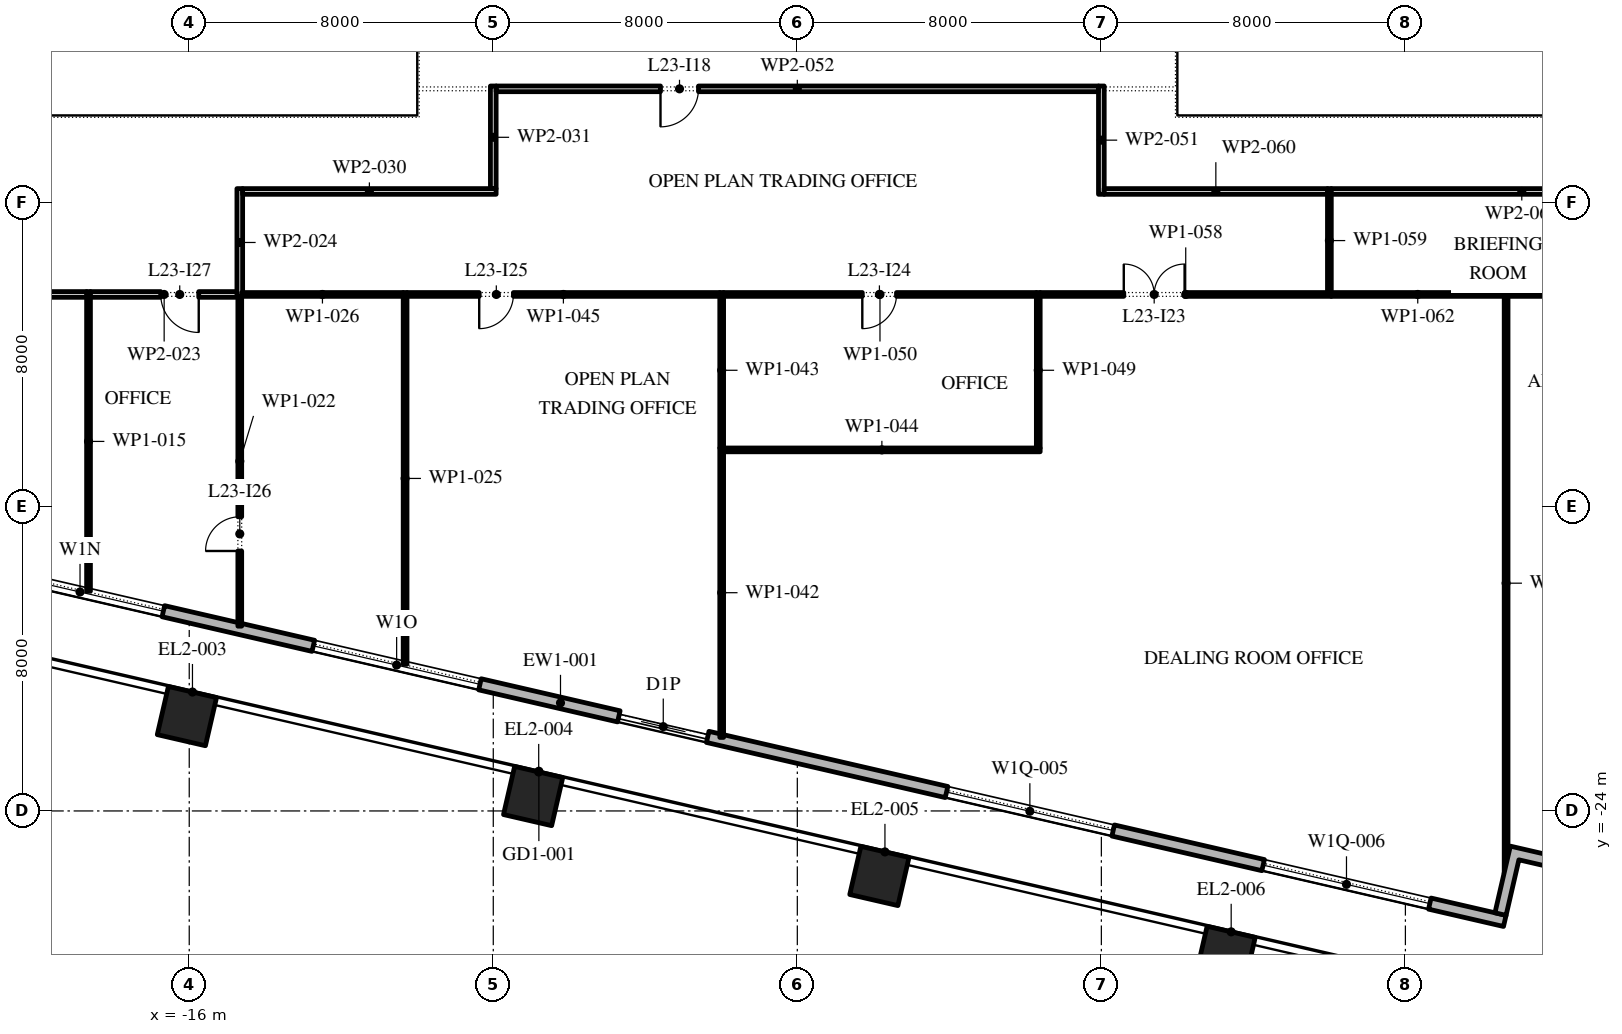
"""IFC4 building model, lengths in metres.
Left out: names, types, materials, properties, quantities, classifications, styles, units other than length and angle.
Written with IfcOpenShell. Run it as: python <this file> out.ifc"""

import sys

from ifc_helpers import new_model, si_unit, direction, frame, frame_2d, origin, origin_2d, place, context, subcontext, project, spatial, polyline, rectangle, outline, extrude, element, fill, save


model = new_model("IFC4")
c1 = context("Model", 3, precision=1e-05, world=origin(), true_north=direction((0.0, 1.0)))
c2 = subcontext(c1, "Body", "Model", "MODEL_VIEW")
j1 = project(units=[si_unit("LENGTHUNIT", "METRE"), si_unit("PLANEANGLEUNIT", "RADIAN")], contexts=[c1])
p1 = place(None, origin())
s1 = spatial("IfcSite", under=j1, at=p1, CompositionType="ELEMENT")
p2 = place(p1, origin())
s2 = spatial("IfcBuilding", under=s1, at=p2, CompositionType="ELEMENT")
p3 = place(p2, frame((0.0, 0.0, 109.8)))
s3 = spatial("IfcBuildingStorey", under=s2, at=p3, CompositionType="ELEMENT", Elevation=109.8)
for number, where, z_axis, x_axis in (
    (1, (-16.061, -21.505, 0.0), (0.0, 0.0, 1.0), (0.974, -0.225, 0.0)),
    (2, (-6.951, -23.608, 0.0), (0.0, 0.0, 1.0), (0.974, -0.225, 0.0)),
    (3, (2.159, -25.711, 0.0), (0.0, 0.0, 1.0), (0.974, -0.225, 0.0)),
    (4, (11.27, -27.815, 0.0), (0.0, 0.0, 1.0), (0.974, -0.225, 0.0)),
):
    element("IfcColumn", number, at=place(p3, frame(where, z_axis=z_axis, x_axis=x_axis)), inside=s3, PredefinedType="COLUMN", context=c2, shape_type="SweptSolid", body=[
        extrude(rectangle(XDim=1.3, YDim=1.3, at=origin_2d()), origin(), (0.0, 0.0, 1.0), 4.2),
    ])
p4 = place(p3, frame((-31.078, -15.421, 0.0), z_axis=(0.0, 0.0, 1.0), x_axis=(0.974370456532, -0.224949357493, 0.0)))
e5 = element("IfcWall", 5, at=p4, inside=s3, PredefinedType="STANDARD", context=c2, shape_type="SweptSolid", body=[
    extrude(rectangle(XDim=51.0, YDim=0.3, at=frame_2d((25.5, 0.0))), origin(), (0.0, 0.0, 1.0), 4.0),
])
p5 = place(p4, frame((1.875, 0.0, 0.45)))
e6 = element("IfcOpeningElement", 6, at=p5, cuts=e5, PredefinedType="OPENING", context=c2, shape_type="SweptSolid", body=[
    extrude(rectangle(XDim=4.5, YDim=2.65, at=frame_2d((2.25, 1.325))), frame((0.0, 0.16, 0.0), z_axis=(0.0, -1.0, 0.0), x_axis=(1.0, 0.0, 0.0)), (0.0, 0.0, 1.0), 0.32),
])
p6 = place(p4, frame((10.275, 0.0, 0.45)))
e7 = element("IfcOpeningElement", 7, at=p6, cuts=e5, PredefinedType="OPENING", context=c2, shape_type="SweptSolid", body=[
    extrude(rectangle(XDim=4.5, YDim=2.525, at=frame_2d((2.25, 1.262))), frame((0.0, 0.16, 0.0), z_axis=(0.0, -1.0, 0.0), x_axis=(1.0, 0.0, 0.0)), (0.0, 0.0, 1.0), 0.32),
])
p7 = place(p4, frame((18.825, 0.0, 0.45)))
e8 = element("IfcOpeningElement", 8, at=p7, cuts=e5, PredefinedType="OPENING", context=c2, shape_type="SweptSolid", body=[
    extrude(rectangle(XDim=4.5, YDim=2.5, at=frame_2d((2.25, 1.25))), frame((0.0, 0.16, 0.0), z_axis=(0.0, -1.0, 0.0), x_axis=(1.0, 0.0, 0.0)), (0.0, 0.0, 1.0), 0.32),
])
p8 = place(p4, frame((27.075, 0.0, 0.0)))
e9 = element("IfcOpeningElement", 9, at=p8, cuts=e5, PredefinedType="OPENING", context=c2, shape_type="SweptSolid", body=[
    extrude(rectangle(XDim=2.4, YDim=2.9, at=frame_2d((1.2, 1.45))), frame((0.0, 0.16, 0.0), z_axis=(0.0, -1.0, 0.0), x_axis=(1.0, 0.0, 0.0)), (0.0, 0.0, 1.0), 0.32),
])
p9 = place(p4, frame((35.925, 0.0, 0.45)))
e10 = element("IfcOpeningElement", 10, at=p9, cuts=e5, PredefinedType="OPENING", context=c2, shape_type="SweptSolid", body=[
    extrude(rectangle(XDim=4.5, YDim=2.45, at=frame_2d((2.25, 1.225))), frame((0.0, 0.16, 0.0), z_axis=(0.0, -1.0, 0.0), x_axis=(1.0, 0.0, 0.0)), (0.0, 0.0, 1.0), 0.32),
])
p10 = place(p4, frame((44.475, 0.0, 0.45)))
e11 = element("IfcOpeningElement", 11, at=p10, cuts=e5, PredefinedType="OPENING", context=c2, shape_type="SweptSolid", body=[
    extrude(rectangle(XDim=4.5, YDim=2.45, at=frame_2d((2.25, 1.225))), frame((0.0, 0.16, 0.0), z_axis=(0.0, -1.0, 0.0), x_axis=(1.0, 0.0, 0.0)), (0.0, 0.0, 1.0), 0.32),
])
p11 = place(p3, origin())
e12 = element("IfcWall", 12, at=p11, inside=s3, PredefinedType="STANDARD", context=c2, shape_type="SweptSolid", body=[
    extrude(outline(polyline([(20.515, -25.331), (20.92, -23.577), (22.967, -24.049), (22.899, -24.342), (21.145, -23.937), (20.74, -25.691), (18.986, -25.286), (18.649, -26.747), (18.357, -26.68), (18.762, -24.926), (20.515, -25.331)])), origin(), (0.0, 0.0, 1.0), 4.0),
])
p12 = place(p3, frame((-18.65, -18.219, 0.0), z_axis=(0.0, 0.0, 1.0), x_axis=(0.0, 1.0, 0.0)))
e13 = element("IfcWall", 13, at=p12, inside=s3, PredefinedType="PARTITIONING", context=c2, shape_type="SweptSolid", body=[
    extrude(rectangle(XDim=7.884, YDim=0.1, at=frame_2d((3.942, 0.0))), origin(), (0.0, 0.0, 1.0), 4.0),
])
p13 = place(p3, frame((-18.7, -10.41, 0.0), z_axis=(0.0, 0.0, 1.0), x_axis=(-1.0, 0.0, 0.0)))
e14 = element("IfcWall", 14, at=p13, inside=s3, PredefinedType="PARTITIONING", context=c2, shape_type="SweptSolid", body=[
    extrude(rectangle(XDim=3.8, YDim=0.15, at=frame_2d((1.9, 0.0))), origin(), (0.0, 0.0, 1.0), 4.0),
])
p14 = place(p13, frame((1.4, 0.0, 0.0)))
e15 = element("IfcOpeningElement", 15, at=p14, cuts=e14, PredefinedType="OPENING", context=c2, shape_type="SweptSolid", body=[
    extrude(rectangle(XDim=1.0, YDim=2.1, at=frame_2d((0.5, 1.05))), frame((0.0, 0.085, 0.0), z_axis=(0.0, -1.0, 0.0), x_axis=(1.0, 0.0, 0.0)), (0.0, 0.0, 1.0), 0.17),
])
p15 = place(p3, frame((-14.67, -19.138, 0.0), z_axis=(0.0, 0.0, 1.0), x_axis=(0.0, 1.0, 0.0)))
e16 = element("IfcWall", 16, at=p15, inside=s3, PredefinedType="PARTITIONING", context=c2, shape_type="SweptSolid", body=[
    extrude(rectangle(XDim=8.678, YDim=0.1, at=frame_2d((4.339, 0.0))), origin(), (0.0, 0.0, 1.0), 4.0),
])
p16 = place(p15, frame((1.978, 0.0, 0.0)))
e17 = element("IfcOpeningElement", 17, at=p16, cuts=e16, PredefinedType="OPENING", context=c2, shape_type="SweptSolid", body=[
    extrude(rectangle(XDim=0.9, YDim=2.1, at=frame_2d((0.45, 1.05))), frame((0.0, 0.06, 0.0), z_axis=(0.0, -1.0, 0.0), x_axis=(1.0, 0.0, 0.0)), (0.0, 0.0, 1.0), 0.12),
])
p17 = place(p3, frame((-14.72, -10.41, 0.0), z_axis=(0.0, 0.0, 1.0), x_axis=(-1.0, 0.0, 0.0)))
e18 = element("IfcWall", 18, at=p17, inside=s3, PredefinedType="PARTITIONING", context=c2, shape_type="SweptSolid", body=[
    extrude(rectangle(XDim=3.88, YDim=0.15, at=frame_2d((1.94, 0.0))), origin(), (0.0, 0.0, 1.0), 4.0),
])
p18 = place(p17, frame((1.03, 0.0, 0.0)))
e19 = element("IfcOpeningElement", 19, at=p18, cuts=e18, PredefinedType="OPENING", context=c2, shape_type="SweptSolid", body=[
    extrude(rectangle(XDim=1.0, YDim=2.1, at=frame_2d((0.5, 1.05))), frame((0.0, 0.085, 0.0), z_axis=(0.0, -1.0, 0.0), x_axis=(1.0, 0.0, 0.0)), (0.0, 0.0, 1.0), 0.17),
])
p19 = place(p3, frame((-14.67, -7.625, 0.0), z_axis=(0.0, 0.0, 1.0), x_axis=(0.0, -1.0, 0.0)))
e20 = element("IfcWall", 20, at=p19, inside=s3, PredefinedType="PARTITIONING", context=c2, shape_type="SweptSolid", body=[
    extrude(rectangle(XDim=2.835, YDim=0.15, at=frame_2d((1.417, 0.0))), origin(), (0.0, 0.0, 1.0), 4.0),
])
p20 = place(p3, frame((-10.32, -20.142, 0.0), z_axis=(0.0, 0.0, 1.0), x_axis=(0.0, 1.0, 0.0)))
e21 = element("IfcWall", 21, at=p20, inside=s3, PredefinedType="PARTITIONING", context=c2, shape_type="SweptSolid", body=[
    extrude(rectangle(XDim=9.782, YDim=0.1, at=frame_2d((4.891, 0.0))), origin(), (0.0, 0.0, 1.0), 4.0),
])
p21 = place(p3, frame((-10.37, -10.41, 0.0), z_axis=(0.0, 0.0, 1.0), x_axis=(-1.0, 0.0, 0.0)))
e22 = element("IfcWall", 22, at=p21, inside=s3, PredefinedType="PARTITIONING", context=c2, shape_type="SweptSolid", body=[
    extrude(rectangle(XDim=4.25, YDim=0.1, at=frame_2d((2.125, 0.0))), origin(), (0.0, 0.0, 1.0), 4.0),
])
p22 = place(p3, frame((-7.925, -7.7, 0.0), z_axis=(0.0, 0.0, 1.0), x_axis=(-1.0, 0.0, 0.0)))
e23 = element("IfcWall", 23, at=p22, inside=s3, PredefinedType="PARTITIONING", context=c2, shape_type="SweptSolid", body=[
    extrude(rectangle(XDim=6.67, YDim=0.15, at=frame_2d((3.335, 0.0))), origin(), (0.0, 0.0, 1.0), 4.0),
])
p23 = place(p3, frame((-8.0, -4.925, 0.0), z_axis=(0.0, 0.0, 1.0), x_axis=(0.0, -1.0, 0.0)))
e24 = element("IfcWall", 24, at=p23, inside=s3, PredefinedType="PARTITIONING", context=c2, shape_type="SweptSolid", body=[
    extrude(rectangle(XDim=2.7, YDim=0.15, at=frame_2d((1.35, 0.0))), origin(), (0.0, 0.0, 1.0), 4.0),
])
p24 = place(p3, frame((-1.99, -22.065, 0.0), z_axis=(0.0, 0.0, 1.0), x_axis=(0.0, 1.0, 0.0)))
e25 = element("IfcWall", 25, at=p24, inside=s3, PredefinedType="PARTITIONING", context=c2, shape_type="SweptSolid", body=[
    extrude(rectangle(XDim=7.615, YDim=0.1, at=frame_2d((3.808, 0.0))), origin(), (0.0, 0.0, 1.0), 4.0),
])
p25 = place(p3, frame((-1.99, -14.45, 0.0), z_axis=(0.0, 0.0, 1.0), x_axis=(0.0, 1.0, 0.0)))
e26 = element("IfcWall", 26, at=p25, inside=s3, PredefinedType="PARTITIONING", context=c2, shape_type="SweptSolid", body=[
    extrude(rectangle(XDim=4.09, YDim=0.1, at=frame_2d((2.045, 0.0))), origin(), (0.0, 0.0, 1.0), 4.0),
])
p26 = place(p3, frame((-1.94, -14.5, 0.0), z_axis=(0.0, 0.0, 1.0), x_axis=(1.0, 0.0, 0.0)))
e27 = element("IfcWall", 27, at=p26, inside=s3, PredefinedType="PARTITIONING", context=c2, shape_type="SweptSolid", body=[
    extrude(rectangle(XDim=8.33, YDim=0.1, at=frame_2d((4.165, 0.0))), origin(), (0.0, 0.0, 1.0), 4.0),
])
p27 = place(p3, frame((-2.04, -10.41, 0.0), z_axis=(0.0, 0.0, 1.0), x_axis=(-1.0, 0.0, 0.0)))
e28 = element("IfcWall", 28, at=p27, inside=s3, PredefinedType="PARTITIONING", context=c2, shape_type="SweptSolid", body=[
    extrude(rectangle(XDim=8.23, YDim=0.1, at=frame_2d((4.115, 0.0))), origin(), (0.0, 0.0, 1.0), 4.0),
])
p28 = place(p27, frame((5.43, 0.0, 0.0)))
e29 = element("IfcOpeningElement", 29, at=p28, cuts=e28, PredefinedType="OPENING", context=c2, shape_type="SweptSolid", body=[
    extrude(rectangle(XDim=0.9, YDim=2.1, at=frame_2d((0.45, 1.05))), frame((0.0, 0.06, 0.0), z_axis=(0.0, -1.0, 0.0), x_axis=(1.0, 0.0, 0.0)), (0.0, 0.0, 1.0), 0.12),
])
p29 = place(p3, frame((6.34, -14.45, 0.0), z_axis=(0.0, 0.0, 1.0), x_axis=(0.0, 1.0, 0.0)))
e30 = element("IfcWall", 30, at=p29, inside=s3, PredefinedType="PARTITIONING", context=c2, shape_type="SweptSolid", body=[
    extrude(rectangle(XDim=4.09, YDim=0.1, at=frame_2d((2.045, 0.0))), origin(), (0.0, 0.0, 1.0), 4.0),
])
p30 = place(p3, frame((6.29, -10.41, 0.0), z_axis=(0.0, 0.0, 1.0), x_axis=(-1.0, 0.0, 0.0)))
e31 = element("IfcWall", 31, at=p30, inside=s3, PredefinedType="PARTITIONING", context=c2, shape_type="SweptSolid", body=[
    extrude(rectangle(XDim=8.23, YDim=0.1, at=frame_2d((4.115, 0.0))), origin(), (0.0, 0.0, 1.0), 4.0),
])
p31 = place(p30, frame((3.68, 0.0, 0.0)))
e32 = element("IfcOpeningElement", 32, at=p31, cuts=e31, PredefinedType="OPENING", context=c2, shape_type="SweptSolid", body=[
    extrude(rectangle(XDim=0.9, YDim=2.1, at=frame_2d((0.45, 1.05))), frame((0.0, 0.06, 0.0), z_axis=(0.0, -1.0, 0.0), x_axis=(1.0, 0.0, 0.0)), (0.0, 0.0, 1.0), 0.12),
])
p32 = place(p3, frame((8.0, -7.775, 0.0), z_axis=(0.0, 0.0, 1.0), x_axis=(0.0, 1.0, 0.0)))
e33 = element("IfcWall", 33, at=p32, inside=s3, PredefinedType="PARTITIONING", context=c2, shape_type="SweptSolid", body=[
    extrude(rectangle(XDim=2.85, YDim=0.15, at=frame_2d((1.425, 0.0))), origin(), (0.0, 0.0, 1.0), 4.0),
])
p33 = place(p3, frame((7.925, -5.0, 0.0), z_axis=(0.0, 0.0, 1.0), x_axis=(-1.0, 0.0, 0.0)))
e34 = element("IfcWall", 34, at=p33, inside=s3, PredefinedType="PARTITIONING", context=c2, shape_type="SweptSolid", body=[
    extrude(rectangle(XDim=15.85, YDim=0.15, at=frame_2d((7.925, 0.0))), origin(), (0.0, 0.0, 1.0), 4.0),
])
p34 = place(p33, frame((10.525, 0.0, 0.0)))
e35 = element("IfcOpeningElement", 35, at=p34, cuts=e34, PredefinedType="OPENING", context=c2, shape_type="SweptSolid", body=[
    extrude(rectangle(XDim=1.0, YDim=2.1, at=frame_2d((0.5, 1.05))), frame((0.0, 0.085, 0.0), z_axis=(0.0, -1.0, 0.0), x_axis=(1.0, 0.0, 0.0)), (0.0, 0.0, 1.0), 0.17),
])
p35 = place(p3, frame((14.05, -10.41, 0.0), z_axis=(0.0, 0.0, 1.0), x_axis=(-1.0, 0.0, 0.0)))
e36 = element("IfcWall", 36, at=p35, inside=s3, PredefinedType="PARTITIONING", context=c2, shape_type="SweptSolid", body=[
    extrude(rectangle(XDim=7.66, YDim=0.1, at=frame_2d((3.83, 0.0))), origin(), (0.0, 0.0, 1.0), 4.0),
])
p36 = place(p35, frame((3.86, 0.0, 0.0)))
e37 = element("IfcOpeningElement", 37, at=p36, cuts=e36, PredefinedType="OPENING", context=c2, shape_type="SweptSolid", body=[
    extrude(rectangle(XDim=1.6, YDim=2.1, at=frame_2d((0.8, 1.05))), frame((0.0, 0.06, 0.0), z_axis=(0.0, -1.0, 0.0), x_axis=(1.0, 0.0, 0.0)), (0.0, 0.0, 1.0), 0.12),
])
p37 = place(p3, frame((14.0, -10.36, 0.0), z_axis=(0.0, 0.0, 1.0), x_axis=(0.0, 1.0, 0.0)))
e38 = element("IfcWall", 38, at=p37, inside=s3, PredefinedType="PARTITIONING", context=c2, shape_type="SweptSolid", body=[
    extrude(rectangle(XDim=2.735, YDim=0.1, at=frame_2d((1.368, 0.0))), origin(), (0.0, 0.0, 1.0), 4.0),
])
p38 = place(p3, frame((13.95, -7.7, 0.0), z_axis=(0.0, 0.0, 1.0), x_axis=(-1.0, 0.0, 0.0)))
e39 = element("IfcWall", 39, at=p38, inside=s3, PredefinedType="PARTITIONING", context=c2, shape_type="SweptSolid", body=[
    extrude(rectangle(XDim=5.875, YDim=0.15, at=frame_2d((2.938, 0.0))), origin(), (0.0, 0.0, 1.0), 4.0),
])
p39 = place(p3, frame((18.65, -25.654, 0.0), z_axis=(0.0, 0.0, 1.0), x_axis=(0.0, 1.0, 0.0)))
e40 = element("IfcWall", 40, at=p39, inside=s3, PredefinedType="PARTITIONING", context=c2, shape_type="SweptSolid", body=[
    extrude(rectangle(XDim=15.294, YDim=0.1, at=frame_2d((7.647, 0.0))), origin(), (0.0, 0.0, 1.0), 4.0),
])
p40 = place(p3, frame((18.6, -10.41, 0.0), z_axis=(0.0, 0.0, 1.0), x_axis=(-1.0, 0.0, 0.0)))
e41 = element("IfcWall", 41, at=p40, inside=s3, PredefinedType="PARTITIONING", context=c2, shape_type="SweptSolid", body=[
    extrude(rectangle(XDim=4.55, YDim=0.1, at=frame_2d((2.275, 0.0))), origin(), (0.0, 0.0, 1.0), 4.0),
])
p41 = place(p3, frame((24.075, -7.7, 0.0), z_axis=(0.0, 0.0, 1.0), x_axis=(-1.0, 0.0, 0.0)))
e42 = element("IfcWall", 42, at=p41, inside=s3, PredefinedType="PARTITIONING", context=c2, shape_type="SweptSolid", body=[
    extrude(rectangle(XDim=10.025, YDim=0.15, at=frame_2d((5.012, 0.0))), origin(), (0.0, 0.0, 1.0), 4.0),
])
p42 = place(p41, frame((2.675, 0.0, 0.0)))
e43 = element("IfcOpeningElement", 43, at=p42, cuts=e42, PredefinedType="OPENING", context=c2, shape_type="SweptSolid", body=[
    extrude(rectangle(XDim=1.0, YDim=2.1, at=frame_2d((0.5, 1.05))), frame((0.0, 0.085, 0.0), z_axis=(0.0, -1.0, 0.0), x_axis=(1.0, 0.0, 0.0)), (0.0, 0.0, 1.0), 0.17),
])
p43 = place(p3, frame((25.05, -10.41, 0.0), z_axis=(0.0, 0.0, 1.0), x_axis=(-1.0, 0.0, 0.0)))
e44 = element("IfcWall", 44, at=p43, inside=s3, PredefinedType="PARTITIONING", context=c2, shape_type="SweptSolid", body=[
    extrude(rectangle(XDim=6.35, YDim=0.1, at=frame_2d((3.175, 0.0))), origin(), (0.0, 0.0, 1.0), 4.0),
])
p44 = place(p43, frame((3.3, 0.0, 0.0)))
e45 = element("IfcOpeningElement", 45, at=p44, cuts=e44, PredefinedType="OPENING", context=c2, shape_type="SweptSolid", body=[
    extrude(rectangle(XDim=0.9, YDim=2.1, at=frame_2d((0.45, 1.05))), frame((0.0, 0.06, 0.0), z_axis=(0.0, -1.0, 0.0), x_axis=(1.0, 0.0, 0.0)), (0.0, 0.0, 1.0), 0.12),
])
p45 = place(p6, origin())
e46 = element("IfcWindow", 46, at=p45, inside=s3, PartitioningType="DOUBLE_PANEL_VERTICAL", PredefinedType="WINDOW", context=c2, shape_type="SweptSolid", body=[
    extrude(rectangle(XDim=4.5, YDim=2.525, at=frame_2d((2.25, 1.262))), frame((0.0, 0.03, 0.0), z_axis=(0.0, -1.0, 0.0), x_axis=(1.0, 0.0, 0.0)), (0.0, 0.0, 1.0), 0.06),
])
fill(e7, e46)
p46 = place(p7, origin())
e47 = element("IfcWindow", 47, at=p46, inside=s3, PartitioningType="DOUBLE_PANEL_VERTICAL", PredefinedType="WINDOW", context=c2, shape_type="SweptSolid", body=[
    extrude(rectangle(XDim=4.5, YDim=2.5, at=frame_2d((2.25, 1.25))), frame((0.0, 0.03, 0.0), z_axis=(0.0, -1.0, 0.0), x_axis=(1.0, 0.0, 0.0)), (0.0, 0.0, 1.0), 0.06),
])
fill(e8, e47)
p47 = place(p8, origin())
e48 = element("IfcDoor", 48, at=p47, inside=s3, OperationType="DOUBLE_DOOR_SLIDING", PredefinedType="DOOR", context=c2, shape_type="SweptSolid", body=[
    extrude(rectangle(XDim=2.4, YDim=2.9, at=frame_2d((1.2, 1.45))), frame((0.0, 0.025, 0.0), z_axis=(0.0, -1.0, 0.0), x_axis=(1.0, 0.0, 0.0)), (0.0, 0.0, 1.0), 0.05),
])
fill(e9, e48)
p48 = place(p9, origin())
e49 = element("IfcWindow", 49, at=p48, inside=s3, PartitioningType="DOUBLE_PANEL_VERTICAL", PredefinedType="WINDOW", context=c2, shape_type="SweptSolid", body=[
    extrude(rectangle(XDim=4.5, YDim=2.45, at=frame_2d((2.25, 1.225))), frame((0.0, 0.03, 0.0), z_axis=(0.0, -1.0, 0.0), x_axis=(1.0, 0.0, 0.0)), (0.0, 0.0, 1.0), 0.06),
])
fill(e10, e49)
p49 = place(p10, origin())
e50 = element("IfcWindow", 50, at=p49, inside=s3, PartitioningType="DOUBLE_PANEL_VERTICAL", PredefinedType="WINDOW", context=c2, shape_type="SweptSolid", body=[
    extrude(rectangle(XDim=4.5, YDim=2.45, at=frame_2d((2.25, 1.225))), frame((0.0, 0.03, 0.0), z_axis=(0.0, -1.0, 0.0), x_axis=(1.0, 0.0, 0.0)), (0.0, 0.0, 1.0), 0.06),
])
fill(e11, e50)
p50 = place(p34, origin())
e51 = element("IfcDoor", 51, at=p50, inside=s3, OperationType="SINGLE_SWING_LEFT", PredefinedType="DOOR", context=c2, shape_type="SweptSolid", body=[
    extrude(rectangle(XDim=1.0, YDim=2.1, at=frame_2d((0.5, 1.05))), frame((0.0, 0.025, 0.0), z_axis=(0.0, -1.0, 0.0), x_axis=(1.0, 0.0, 0.0)), (0.0, 0.0, 1.0), 0.05),
])
fill(e35, e51)
p51 = place(p36, frame((1.6, 0.0, 0.0), z_axis=(0.0, 0.0, 1.0), x_axis=(-1.0, 0.0, 0.0)))
e52 = element("IfcDoor", 52, at=p51, inside=s3, OperationType="SINGLE_SWING_LEFT", PredefinedType="DOOR", context=c2, shape_type="SweptSolid", body=[
    extrude(rectangle(XDim=1.6, YDim=2.1, at=frame_2d((0.8, 1.05))), frame((0.0, 0.025, 0.0), z_axis=(0.0, -1.0, 0.0), x_axis=(1.0, 0.0, 0.0)), (0.0, 0.0, 1.0), 0.05),
])
fill(e37, e52)
p52 = place(p31, origin())
e53 = element("IfcDoor", 53, at=p52, inside=s3, OperationType="SINGLE_SWING_LEFT", PredefinedType="DOOR", context=c2, shape_type="SweptSolid", body=[
    extrude(rectangle(XDim=0.9, YDim=2.1, at=frame_2d((0.45, 1.05))), frame((0.0, 0.025, 0.0), z_axis=(0.0, -1.0, 0.0), x_axis=(1.0, 0.0, 0.0)), (0.0, 0.0, 1.0), 0.05),
])
fill(e32, e53)
p53 = place(p28, origin())
e54 = element("IfcDoor", 54, at=p53, inside=s3, OperationType="SINGLE_SWING_LEFT", PredefinedType="DOOR", context=c2, shape_type="SweptSolid", body=[
    extrude(rectangle(XDim=0.9, YDim=2.1, at=frame_2d((0.45, 1.05))), frame((0.0, 0.025, 0.0), z_axis=(0.0, -1.0, 0.0), x_axis=(1.0, 0.0, 0.0)), (0.0, 0.0, 1.0), 0.05),
])
fill(e29, e54)
p54 = place(p16, origin())
e55 = element("IfcDoor", 55, at=p54, inside=s3, OperationType="SINGLE_SWING_RIGHT", PredefinedType="DOOR", context=c2, shape_type="SweptSolid", body=[
    extrude(rectangle(XDim=0.9, YDim=2.1, at=frame_2d((0.45, 1.05))), frame((0.0, 0.025, 0.0), z_axis=(0.0, -1.0, 0.0), x_axis=(1.0, 0.0, 0.0)), (0.0, 0.0, 1.0), 0.05),
])
fill(e17, e55)
p55 = place(p18, origin())
e56 = element("IfcDoor", 56, at=p55, inside=s3, OperationType="SINGLE_SWING_RIGHT", PredefinedType="DOOR", context=c2, shape_type="SweptSolid", body=[
    extrude(rectangle(XDim=1.0, YDim=2.1, at=frame_2d((0.5, 1.05))), frame((0.0, 0.025, 0.0), z_axis=(0.0, -1.0, 0.0), x_axis=(1.0, 0.0, 0.0)), (0.0, 0.0, 1.0), 0.05),
])
fill(e19, e56)
save(model, sys.argv[1])
